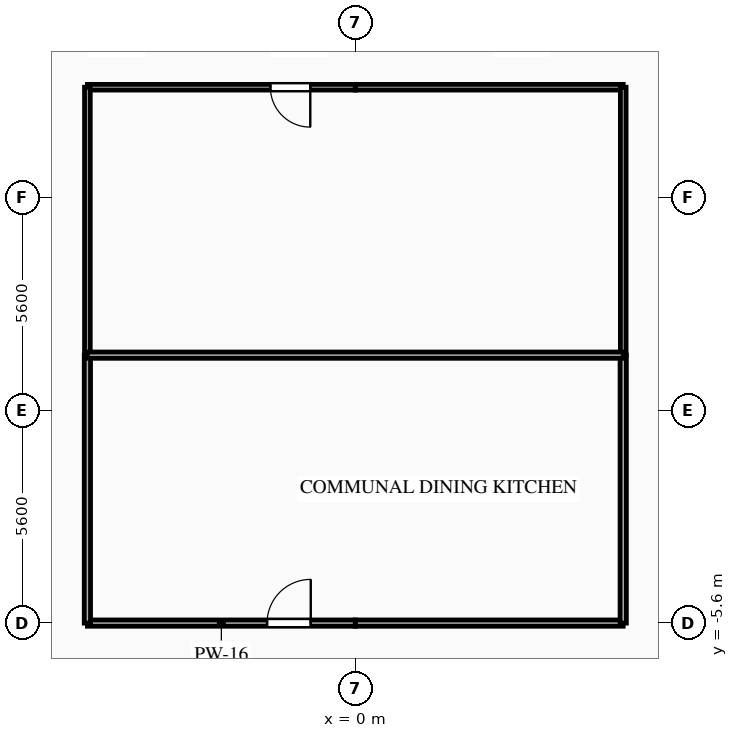
"""IFC4 building model, lengths in metres.
Left out: names, types, materials, properties, quantities, classifications, styles, units other than length and angle.
Written with IfcOpenShell. Run it as: python <this file> out.ifc"""

import sys

from ifc_helpers import new_model, si_unit, direction, frame, frame_2d, origin, place, context, subcontext, project, spatial, rectangle, extrude, element, fill, save


model = new_model("IFC4")
c1 = context("Model", 3, precision=1e-05, world=origin(), true_north=direction((0.0, 1.0)))
c2 = subcontext(c1, "Body", "Model", "MODEL_VIEW")
j1 = project(units=[si_unit("LENGTHUNIT", "METRE"), si_unit("PLANEANGLEUNIT", "RADIAN")], contexts=[c1])
p1 = place(None, origin())
s1 = spatial("IfcSite", under=j1, at=p1, CompositionType="ELEMENT")
p2 = place(p1, origin())
s2 = spatial("IfcBuilding", under=s1, at=p2, CompositionType="ELEMENT")
p3 = place(p2, frame((0.0, 0.0, 53.8)))
s3 = spatial("IfcBuildingStorey", under=s2, at=p3, CompositionType="ELEMENT", Elevation=53.8)
p4 = place(p3, frame((0.0, 8.5, 0.0), z_axis=(0.0, 0.0, 1.0), x_axis=(-1.0, 0.0, 0.0)))
e1 = element("IfcWall", 1, at=p4, inside=s3, PredefinedType="PARTITIONING", context=c2, shape_type="SweptSolid", body=[
    extrude(rectangle(XDim=7.05, YDim=0.15, at=frame_2d((3.525, 0.0))), origin(), (0.0, 0.0, 1.0), 3.035),
])
p5 = place(p4, frame((1.185, 0.0, 0.0)))
e2 = element("IfcOpeningElement", 2, at=p5, cuts=e1, PredefinedType="OPENING", context=c2, shape_type="SweptSolid", body=[
    extrude(rectangle(XDim=1.05, YDim=2.15, at=frame_2d((0.525, 1.075))), frame((0.0, 0.085, 0.0), z_axis=(0.0, -1.0, 0.0), x_axis=(1.0, 0.0, 0.0)), (0.0, 0.0, 1.0), 0.17),
])
p6 = place(p3, frame((7.05, 8.5, 0.0), z_axis=(0.0, 0.0, 1.0), x_axis=(-1.0, 0.0, 0.0)))
e3 = element("IfcWall", 3, at=p6, inside=s3, PredefinedType="PARTITIONING", context=c2, shape_type="SweptSolid", body=[
    extrude(rectangle(XDim=7.05, YDim=0.15, at=frame_2d((3.525, 0.0))), origin(), (0.0, 0.0, 1.0), 3.035),
])
p7 = place(p3, frame((-7.05, -5.6, 0.0), z_axis=(0.0, 0.0, 1.0), x_axis=(1.0, 0.0, 0.0)))
e4 = element("IfcWall", 4, at=p7, inside=s3, PredefinedType="PARTITIONING", context=c2, shape_type="SweptSolid", body=[
    extrude(rectangle(XDim=7.05, YDim=0.165, at=frame_2d((3.525, 0.0))), origin(), (0.0, 0.0, 1.0), 2.52),
])
p8 = place(p7, frame((4.728, 0.0, 0.0)))
e5 = element("IfcOpeningElement", 5, at=p8, cuts=e4, PredefinedType="OPENING", context=c2, shape_type="SweptSolid", body=[
    extrude(rectangle(XDim=1.15, YDim=2.15, at=frame_2d((0.575, 1.075))), frame((0.0, 0.093, 0.0), z_axis=(0.0, -1.0, 0.0), x_axis=(1.0, 0.0, 0.0)), (0.0, 0.0, 1.0), 0.185),
])
p9 = place(p3, frame((0.0, -5.6, 0.0), z_axis=(0.0, 0.0, 1.0), x_axis=(1.0, 0.0, 0.0)))
e6 = element("IfcWall", 6, at=p9, inside=s3, PredefinedType="PARTITIONING", context=c2, shape_type="SweptSolid", body=[
    extrude(rectangle(XDim=7.05, YDim=0.165, at=frame_2d((3.525, 0.0))), origin(), (0.0, 0.0, 1.0), 2.52),
])
p10 = place(p3, frame((-7.05, 1.45, 0.0), z_axis=(0.0, 0.0, 1.0), x_axis=(0.0, -1.0, 0.0)))
e7 = element("IfcWall", 7, at=p10, inside=s3, PredefinedType="PARTITIONING", context=c2, shape_type="SweptSolid", body=[
    extrude(rectangle(XDim=7.05, YDim=0.165, at=frame_2d((3.525, 0.0))), origin(), (0.0, 0.0, 1.0), 3.035),
])
p11 = place(p3, frame((-7.05, 8.5, 0.0), z_axis=(0.0, 0.0, 1.0), x_axis=(0.0, -1.0, 0.0)))
e8 = element("IfcWall", 8, at=p11, inside=s3, PredefinedType="PARTITIONING", context=c2, shape_type="SweptSolid", body=[
    extrude(rectangle(XDim=7.05, YDim=0.15, at=frame_2d((3.525, 0.0))), origin(), (0.0, 0.0, 1.0), 3.035),
])
p12 = place(p3, frame((7.05, -5.6, 0.0), z_axis=(0.0, 0.0, 1.0), x_axis=(0.0, 1.0, 0.0)))
e9 = element("IfcWall", 9, at=p12, inside=s3, PredefinedType="PARTITIONING", context=c2, shape_type="SweptSolid", body=[
    extrude(rectangle(XDim=7.05, YDim=0.165, at=frame_2d((3.525, 0.0))), origin(), (0.0, 0.0, 1.0), 3.035),
])
p13 = place(p3, frame((7.05, 1.45, 0.0), z_axis=(0.0, 0.0, 1.0), x_axis=(0.0, 1.0, 0.0)))
e10 = element("IfcWall", 10, at=p13, inside=s3, PredefinedType="PARTITIONING", context=c2, shape_type="SweptSolid", body=[
    extrude(rectangle(XDim=7.05, YDim=0.15, at=frame_2d((3.525, 0.0))), origin(), (0.0, 0.0, 1.0), 3.035),
])
p14 = place(p3, frame((-7.05, 1.45, 0.0), z_axis=(0.0, 0.0, 1.0), x_axis=(1.0, 0.0, 0.0)))
e11 = element("IfcWall", 11, at=p14, inside=s3, PredefinedType="PARTITIONING", context=c2, shape_type="SweptSolid", body=[
    extrude(rectangle(XDim=14.1, YDim=0.165, at=frame_2d((7.05, 0.0))), origin(), (0.0, 0.0, 1.0), 3.035),
])
p15 = place(p5, origin())
e12 = element("IfcDoor", 12, at=p15, inside=s3, OperationType="SINGLE_SWING_LEFT", PredefinedType="DOOR", context=c2, shape_type="SweptSolid", body=[
    extrude(rectangle(XDim=1.05, YDim=2.15, at=frame_2d((0.525, 1.075))), frame((0.0, 0.025, 0.0), z_axis=(0.0, -1.0, 0.0), x_axis=(1.0, 0.0, 0.0)), (0.0, 0.0, 1.0), 0.05),
])
fill(e2, e12)
p16 = place(p8, origin())
e13 = element("IfcDoor", 13, at=p16, inside=s3, OperationType="SINGLE_SWING_RIGHT", PredefinedType="DOOR", context=c2, shape_type="SweptSolid", body=[
    extrude(rectangle(XDim=1.15, YDim=2.15, at=frame_2d((0.575, 1.075))), frame((0.0, 0.025, 0.0), z_axis=(0.0, -1.0, 0.0), x_axis=(1.0, 0.0, 0.0)), (0.0, 0.0, 1.0), 0.05),
])
fill(e5, e13)
save(model, sys.argv[1])
